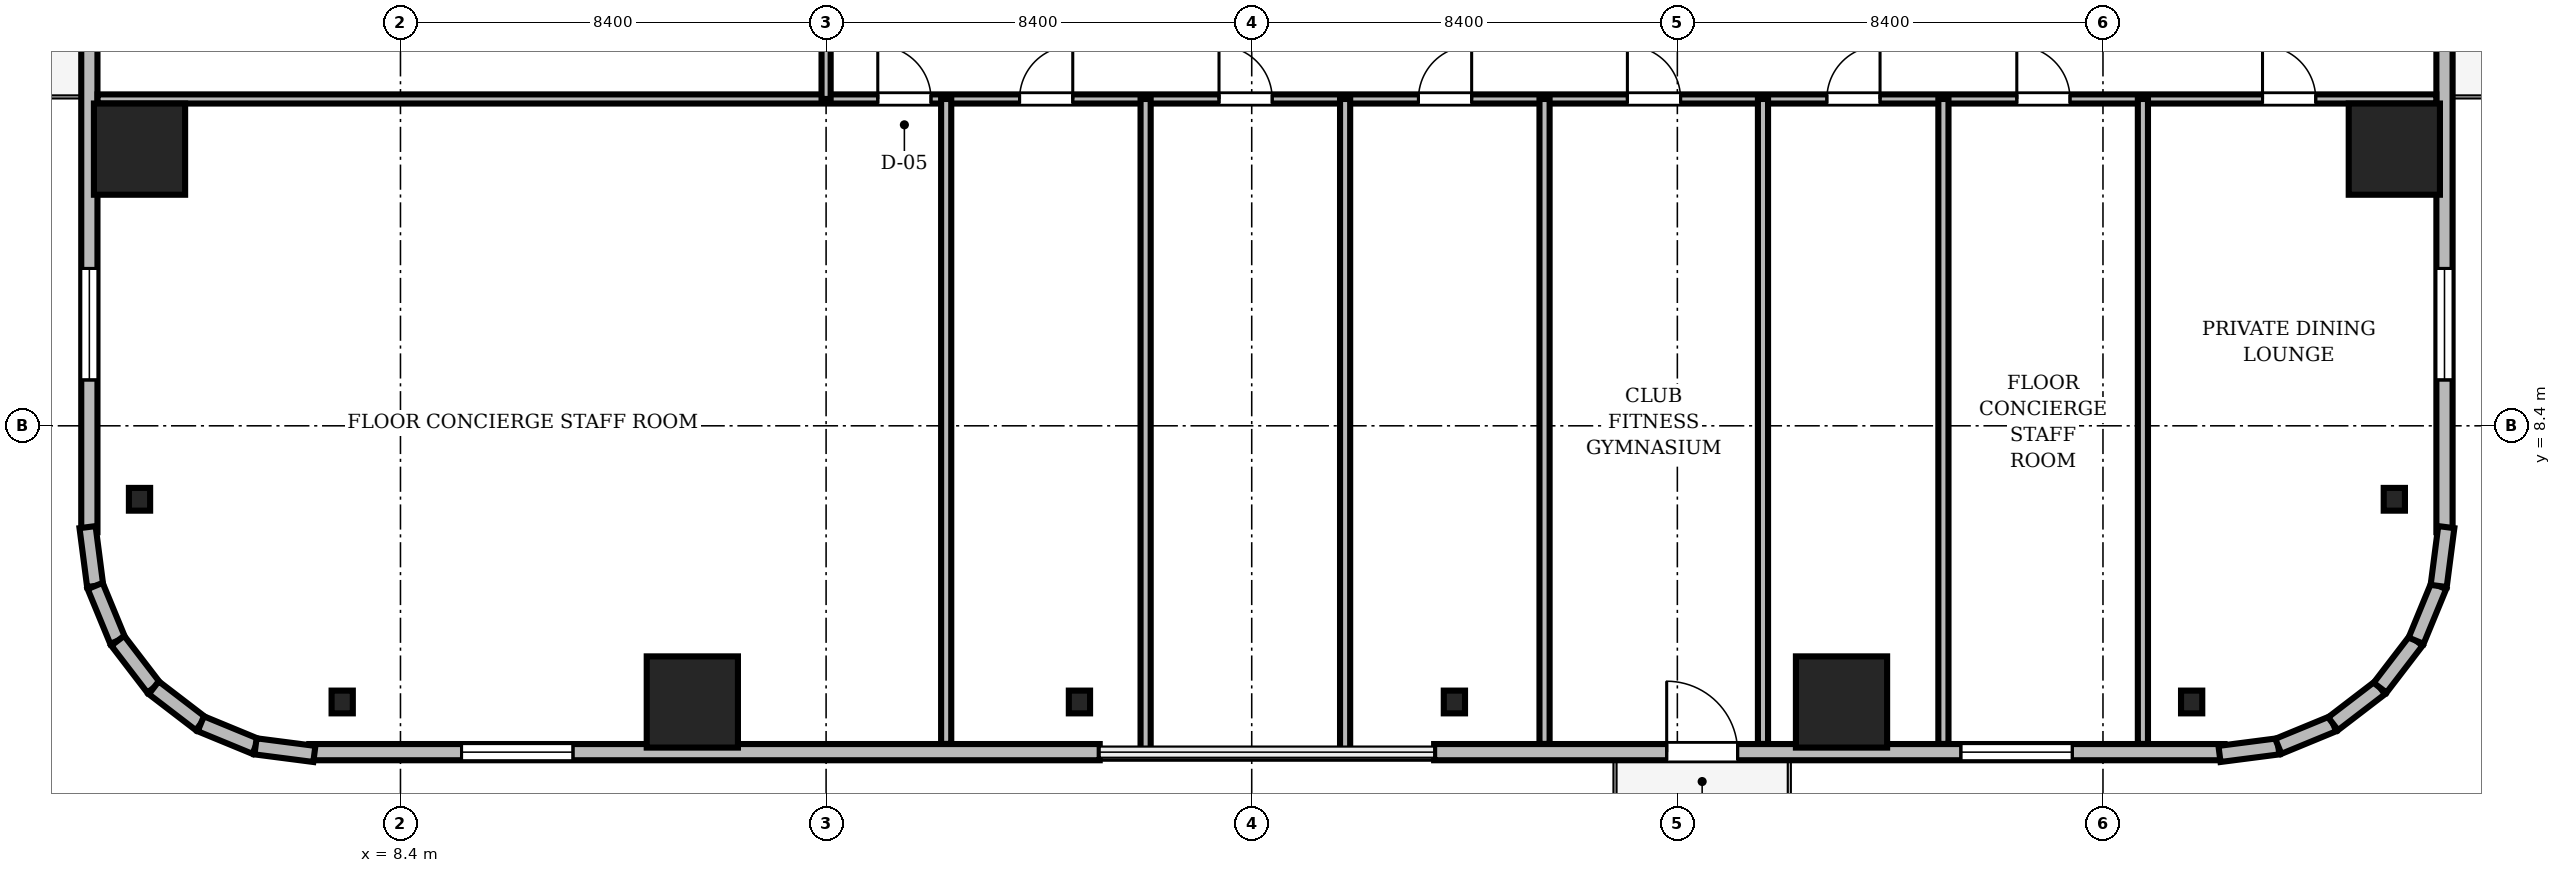
"""IFC4 building model, lengths in metres.
Left out: names, types, materials, properties, quantities, classifications, styles, units other than length and angle.
Written with IfcOpenShell. Run it as: python <this file> out.ifc"""

import sys

from ifc_helpers import new_model, si_unit, direction, frame, frame_2d, origin, origin_2d, place, context, subcontext, project, spatial, rectangle, i_section, extrude, source, transform, mapped, element, fill, save


model = new_model("IFC4")
c1 = context("Model", 3, precision=1e-05, world=origin(), true_north=direction((0.0, 1.0)))
c2 = subcontext(c1, "Body", "Model", "MODEL_VIEW")
j1 = project(units=[si_unit("LENGTHUNIT", "METRE"), si_unit("PLANEANGLEUNIT", "RADIAN")], contexts=[c1])
p1 = place(None, origin())
s1 = spatial("IfcSite", under=j1, at=p1, CompositionType="ELEMENT")
p2 = place(p1, origin())
s2 = spatial("IfcBuilding", under=s1, at=p2, CompositionType="ELEMENT")
p3 = place(p2, frame((0.0, 0.0, 53.15)))
s3 = spatial("IfcBuildingStorey", under=s2, at=p3, CompositionType="ELEMENT", Elevation=53.15)
m1 = source(origin(), c2, "Body", "SweptSolid", [
    extrude(rectangle(XDim=1.8, YDim=1.8, at=origin_2d()), origin(), (0.0, 0.0, 1.0), 3.41),
])
for number, where, z_axis, x_axis in (
    (1, (14.16, 2.95, 0.0), (0.0, 0.0, 1.0), (1.0, 0.0, 0.0)),
    (2, (36.84, 2.95, 0.0), (0.0, 0.0, 1.0), (1.0, 0.0, 0.0)),
    (3, (47.75, 13.86, 0.0), (0.0, 0.0, 1.0), (1.0, 0.0, 0.0)),
    (4, (3.25, 13.86, 0.0), (0.0, 0.0, 1.0), (1.0, 0.0, 0.0)),
):
    element("IfcColumn", number, at=place(p3, frame(where, z_axis=z_axis, x_axis=x_axis)), inside=s3, PredefinedType="COLUMN", context=c2, shape_type="MappedRepresentation", body=[
        mapped(m1, transform((0.0, 0.0, 0.0), scale=1.0)),
    ])
m2 = source(origin(), c2, "Body", "SweptSolid", [
    extrude(i_section(OverallWidth=0.419, OverallDepth=0.449, WebThickness=0.031, FlangeThickness=0.048, FilletRadius=0.015, at=origin_2d()), origin(), (0.0, 0.0, 1.0), 3.41),
])
for number, where, z_axis, x_axis in (
    (5, (7.25, 2.95, 0.0), (0.0, 0.0, 1.0), (1.0, 0.0, 0.0)),
    (6, (21.8, 2.95, 0.0), (0.0, 0.0, 1.0), (1.0, 0.0, 0.0)),
    (7, (29.2, 2.95, 0.0), (0.0, 0.0, 1.0), (1.0, 0.0, 0.0)),
    (8, (43.75, 2.95, 0.0), (0.0, 0.0, 1.0), (1.0, 0.0, 0.0)),
    (9, (47.75, 6.95, 0.0), (0.0, 0.0, 1.0), (1.0, 0.0, 0.0)),
    (10, (3.25, 6.95, 0.0), (0.0, 0.0, 1.0), (1.0, 0.0, 0.0)),
):
    element("IfcColumn", number, at=place(p3, frame(where, z_axis=z_axis, x_axis=x_axis)), inside=s3, PredefinedType="COLUMN", context=c2, shape_type="MappedRepresentation", body=[
        mapped(m2, transform((0.0, 0.0, 0.0), scale=1.0)),
    ])
m3 = source(origin(), c2, "Body", "SweptSolid", [
    extrude(rectangle(XDim=15.6, YDim=0.32, at=frame_2d((7.8, 0.0))), origin(), (0.0, 0.0, 1.0), 3.41),
])
p4 = place(p3, frame((6.6, 1.96, 0.0), z_axis=(0.0, 0.0, 1.0), x_axis=(1.0, 0.0, 0.0)))
e11 = element("IfcWall", 11, at=p4, inside=s3, PredefinedType="SOLIDWALL", context=c2, shape_type="MappedRepresentation", body=[
    mapped(m3, transform((0.0, 0.0, 0.0), scale=1.0)),
])
m4 = source(origin(), c2, "Body", "SweptSolid", [
    extrude(rectangle(XDim=2.2, YDim=2.4, at=frame_2d((1.1, 1.2))), frame((0.0, 0.17, 0.0), z_axis=(0.0, -1.0, 0.0), x_axis=(1.0, 0.0, 0.0)), (0.0, 0.0, 1.0), 0.34),
])
p5 = place(p4, frame((3.005, 0.0, 0.72)))
e12 = element("IfcOpeningElement", 12, at=p5, cuts=e11, PredefinedType="OPENING", context=c2, shape_type="MappedRepresentation", body=[
    mapped(m4, transform((0.0, 0.0, 0.0), scale=1.0)),
])
p6 = place(p3, frame((28.8, 1.96, 0.0), z_axis=(0.0, 0.0, 1.0), x_axis=(1.0, 0.0, 0.0)))
e13 = element("IfcWall", 13, at=p6, inside=s3, PredefinedType="SOLIDWALL", context=c2, shape_type="MappedRepresentation", body=[
    mapped(m3, transform((0.0, 0.0, 0.0), scale=1.0)),
])
m5 = source(origin(), c2, "Body", "SweptSolid", [
    extrude(rectangle(XDim=1.4, YDim=2.3, at=frame_2d((0.7, 1.15))), frame((0.0, 0.17, 0.0), z_axis=(0.0, -1.0, 0.0), x_axis=(1.0, 0.0, 0.0)), (0.0, 0.0, 1.0), 0.34),
])
p7 = place(p6, frame((4.59, 0.0, 0.0)))
e14 = element("IfcOpeningElement", 14, at=p7, cuts=e13, PredefinedType="OPENING", context=c2, shape_type="MappedRepresentation", body=[
    mapped(m5, transform((0.0, 0.0, 0.0), scale=1.0)),
])
p8 = place(p6, frame((10.395, 0.0, 0.72)))
e15 = element("IfcOpeningElement", 15, at=p8, cuts=e13, PredefinedType="OPENING", context=c2, shape_type="MappedRepresentation", body=[
    mapped(m4, transform((0.0, 0.0, 0.0), scale=1.0)),
])
p9 = place(p3, frame((2.26, 21.9, 0.0), z_axis=(0.0, 0.0, 1.0), x_axis=(0.0, -1.0, 0.0)))
e16 = element("IfcWall", 16, at=p9, inside=s3, PredefinedType="SOLIDWALL", context=c2, shape_type="MappedRepresentation", body=[
    mapped(m3, transform((0.0, 0.0, 0.0), scale=1.0)),
])
p10 = place(p9, frame((4.59, 0.0, 0.0)))
e17 = element("IfcOpeningElement", 17, at=p10, cuts=e16, PredefinedType="OPENING", context=c2, shape_type="MappedRepresentation", body=[
    mapped(m5, transform((0.0, 0.0, 0.0), scale=1.0)),
])
p11 = place(p9, frame((10.395, 0.0, 0.72)))
e18 = element("IfcOpeningElement", 18, at=p11, cuts=e16, PredefinedType="OPENING", context=c2, shape_type="MappedRepresentation", body=[
    mapped(m4, transform((0.0, 0.0, 0.0), scale=1.0)),
])
p12 = place(p3, frame((48.74, 6.3, 0.0), z_axis=(0.0, 0.0, 1.0), x_axis=(0.0, 1.0, 0.0)))
e19 = element("IfcWall", 19, at=p12, inside=s3, PredefinedType="SOLIDWALL", context=c2, shape_type="MappedRepresentation", body=[
    mapped(m3, transform((0.0, 0.0, 0.0), scale=1.0)),
])
p13 = place(p12, frame((9.61, 0.0, 0.0)))
e20 = element("IfcOpeningElement", 20, at=p13, cuts=e19, PredefinedType="OPENING", context=c2, shape_type="MappedRepresentation", body=[
    mapped(m5, transform((0.0, 0.0, 0.0), scale=1.0)),
])
p14 = place(p12, frame((3.005, 0.0, 0.72)))
e21 = element("IfcOpeningElement", 21, at=p14, cuts=e19, PredefinedType="OPENING", context=c2, shape_type="MappedRepresentation", body=[
    mapped(m4, transform((0.0, 0.0, 0.0), scale=1.0)),
])
m6 = source(origin(), c2, "Body", "SweptSolid", [
    extrude(rectangle(XDim=1.171, YDim=0.32, at=frame_2d((0.585, 0.0))), origin(), (0.0, 0.0, 1.0), 3.41),
])
p15 = place(p3, frame((2.224, 6.401, 0.0), z_axis=(0.0, 0.0, 1.0), x_axis=(0.128269133229, -0.991739395941, 0.0)))
e22 = element("IfcWall", 22, at=p15, inside=s3, PredefinedType="SOLIDWALL", context=c2, shape_type="MappedRepresentation", body=[
    mapped(m6, transform((0.0, 0.0, 0.0), scale=1.0)),
])
m7 = source(origin(), c2, "Body", "SweptSolid", [
    extrude(rectangle(XDim=1.169, YDim=0.32, at=frame_2d((0.584, 0.0))), origin(), (0.0, 0.0, 1.0), 3.41),
])
for number, where, z_axis, x_axis in (
    (23, (2.375, 5.24, 0.0), (0.0, 0.0, 1.0), (0.381, -0.925, 0.0)),
    (24, (2.82, 4.159, 0.0), (0.0, 0.0, 1.0), (0.608, -0.794, 0.0)),
):
    element("IfcWall", number, at=place(p3, frame(where, z_axis=z_axis, x_axis=x_axis)), inside=s3, PredefinedType="SOLIDWALL", context=c2, shape_type="MappedRepresentation", body=[
        mapped(m7, transform((0.0, 0.0, 0.0), scale=1.0)),
    ])
m8 = source(origin(), c2, "Body", "SweptSolid", [
    extrude(rectangle(XDim=1.169, YDim=0.32, at=frame_2d((0.584, 0.0))), origin(), (0.0, 0.0, 1.0), 3.41),
])
p16 = place(p3, frame((3.531, 3.231, 0.0), z_axis=(0.0, 0.0, 1.0), x_axis=(0.793663520347, -0.608356981114, 0.0)))
e25 = element("IfcWall", 25, at=p16, inside=s3, PredefinedType="SOLIDWALL", context=c2, shape_type="MappedRepresentation", body=[
    mapped(m8, transform((0.0, 0.0, 0.0), scale=1.0)),
])
m9 = source(origin(), c2, "Body", "SweptSolid", [
    extrude(rectangle(XDim=1.169, YDim=0.32, at=frame_2d((0.585, 0.0))), origin(), (0.0, 0.0, 1.0), 3.41),
])
p17 = place(p3, frame((4.459, 2.52, 0.0), z_axis=(0.0, 0.0, 1.0), x_axis=(0.924479075121, -0.381232789334, 0.0)))
e26 = element("IfcWall", 26, at=p17, inside=s3, PredefinedType="SOLIDWALL", context=c2, shape_type="MappedRepresentation", body=[
    mapped(m9, transform((0.0, 0.0, 0.0), scale=1.0)),
])
m10 = source(origin(), c2, "Body", "SweptSolid", [
    extrude(rectangle(XDim=1.17, YDim=0.32, at=frame_2d((0.585, 0.0))), origin(), (0.0, 0.0, 1.0), 3.41),
])
for number, where, z_axis, x_axis in (
    (27, (5.54, 2.074, 0.0), (0.0, 0.0, 1.0), (0.992, -0.128, 0.0)),
    (28, (44.3, 1.925, 0.0), (0.0, 0.0, 1.0), (0.992, 0.128, 0.0)),
):
    element("IfcWall", number, at=place(p3, frame(where, z_axis=z_axis, x_axis=x_axis)), inside=s3, PredefinedType="SOLIDWALL", context=c2, shape_type="MappedRepresentation", body=[
        mapped(m10, transform((0.0, 0.0, 0.0), scale=1.0)),
    ])
p18 = place(p3, frame((45.46, 2.074, 0.0), z_axis=(0.0, 0.0, 1.0), x_axis=(0.924479075121, 0.381232789334, 0.0)))
e29 = element("IfcWall", 29, at=p18, inside=s3, PredefinedType="SOLIDWALL", context=c2, shape_type="MappedRepresentation", body=[
    mapped(m9, transform((0.0, 0.0, 0.0), scale=1.0)),
])
p19 = place(p3, frame((46.541, 2.52, 0.0), z_axis=(0.0, 0.0, 1.0), x_axis=(0.793663520347, 0.608356981114, 0.0)))
e30 = element("IfcWall", 30, at=p19, inside=s3, PredefinedType="SOLIDWALL", context=c2, shape_type="MappedRepresentation", body=[
    mapped(m8, transform((0.0, 0.0, 0.0), scale=1.0)),
])
for number, where, z_axis, x_axis in (
    (31, (47.469, 3.231, 0.0), (0.0, 0.0, 1.0), (0.608, 0.794, 0.0)),
    (32, (48.18, 4.159, 0.0), (0.0, 0.0, 1.0), (0.381, 0.925, 0.0)),
):
    element("IfcWall", number, at=place(p3, frame(where, z_axis=z_axis, x_axis=x_axis)), inside=s3, PredefinedType="SOLIDWALL", context=c2, shape_type="MappedRepresentation", body=[
        mapped(m7, transform((0.0, 0.0, 0.0), scale=1.0)),
    ])
p20 = place(p3, frame((48.625, 5.24, 0.0), z_axis=(0.0, 0.0, 1.0), x_axis=(0.128269133229, 0.991739395941, 0.0)))
e33 = element("IfcWall", 33, at=p20, inside=s3, PredefinedType="SOLIDWALL", context=c2, shape_type="MappedRepresentation", body=[
    mapped(m6, transform((0.0, 0.0, 0.0), scale=1.0)),
])
m11 = source(origin(), c2, "Body", "SweptSolid", [
    extrude(rectangle(XDim=46.156, YDim=0.18, at=frame_2d((23.078, 0.0))), origin(), (0.0, 0.0, 1.0), 2.652),
])
p21 = place(p3, frame((2.422, 14.85, 0.0), z_axis=(0.0, 0.0, 1.0), x_axis=(1.0, 0.0, 0.0)))
e34 = element("IfcWall", 34, at=p21, inside=s3, PredefinedType="PARTITIONING", context=c2, shape_type="MappedRepresentation", body=[
    mapped(m11, transform((0.0, 0.0, 0.0), scale=1.0)),
])
m12 = source(origin(), c2, "Body", "SweptSolid", [
    extrude(rectangle(XDim=1.05, YDim=2.2, at=frame_2d((0.525, 1.1))), frame((0.0, 0.1, 0.0), z_axis=(0.0, -1.0, 0.0), x_axis=(1.0, 0.0, 0.0)), (0.0, 0.0, 1.0), 0.2),
])
p22 = place(p21, frame((15.398, 0.0, 0.0)))
e35 = element("IfcOpeningElement", 35, at=p22, cuts=e34, PredefinedType="OPENING", context=c2, shape_type="MappedRepresentation", body=[
    mapped(m12, transform((0.0, 0.0, 0.0), scale=1.0)),
])
p23 = place(p21, frame((18.196, 0.0, 0.0)))
e36 = element("IfcOpeningElement", 36, at=p23, cuts=e34, PredefinedType="OPENING", context=c2, shape_type="MappedRepresentation", body=[
    mapped(m12, transform((0.0, 0.0, 0.0), scale=1.0)),
])
p24 = place(p21, frame((22.132, 0.0, 0.0)))
e37 = element("IfcOpeningElement", 37, at=p24, cuts=e34, PredefinedType="OPENING", context=c2, shape_type="MappedRepresentation", body=[
    mapped(m12, transform((0.0, 0.0, 0.0), scale=1.0)),
])
p25 = place(p21, frame((26.069, 0.0, 0.0)))
e38 = element("IfcOpeningElement", 38, at=p25, cuts=e34, PredefinedType="OPENING", context=c2, shape_type="MappedRepresentation", body=[
    mapped(m12, transform((0.0, 0.0, 0.0), scale=1.0)),
])
p26 = place(p21, frame((30.192, 0.0, 0.0)))
e39 = element("IfcOpeningElement", 39, at=p26, cuts=e34, PredefinedType="OPENING", context=c2, shape_type="MappedRepresentation", body=[
    mapped(m12, transform((0.0, 0.0, 0.0), scale=1.0)),
])
p27 = place(p21, frame((34.128, 0.0, 0.0)))
e40 = element("IfcOpeningElement", 40, at=p27, cuts=e34, PredefinedType="OPENING", context=c2, shape_type="MappedRepresentation", body=[
    mapped(m12, transform((0.0, 0.0, 0.0), scale=1.0)),
])
p28 = place(p21, frame((37.877, 0.0, 0.0)))
e41 = element("IfcOpeningElement", 41, at=p28, cuts=e34, PredefinedType="OPENING", context=c2, shape_type="MappedRepresentation", body=[
    mapped(m12, transform((0.0, 0.0, 0.0), scale=1.0)),
])
p29 = place(p21, frame((42.727, 0.0, 0.0)))
e42 = element("IfcOpeningElement", 42, at=p29, cuts=e34, PredefinedType="OPENING", context=c2, shape_type="MappedRepresentation", body=[
    mapped(m12, transform((0.0, 0.0, 0.0), scale=1.0)),
])
m13 = source(origin(), c2, "Body", "SweptSolid", [
    extrude(rectangle(XDim=13.7, YDim=0.18, at=frame_2d((6.85, 0.0))), origin(), (0.0, 0.0, 1.0), 2.802),
])
p30 = place(p3, frame((16.8, 14.85, 0.0), z_axis=(0.0, 0.0, 1.0), x_axis=(0.0, 1.0, 0.0)))
e43 = element("IfcWall", 43, at=p30, inside=s3, PredefinedType="PARTITIONING", context=c2, shape_type="MappedRepresentation", body=[
    mapped(m13, transform((0.0, 0.0, 0.0), scale=1.0)),
])
p31 = place(p30, frame((2.867, 0.0, 0.0)))
e44 = element("IfcOpeningElement", 44, at=p31, cuts=e43, PredefinedType="OPENING", context=c2, shape_type="MappedRepresentation", body=[
    mapped(m12, transform((0.0, 0.0, 0.0), scale=1.0)),
])
m14 = source(origin(), c2, "Body", "SweptSolid", [
    extrude(rectangle(XDim=0.95, YDim=2.15, at=frame_2d((0.475, 1.075))), frame((0.0, 0.1, 0.0), z_axis=(0.0, -1.0, 0.0), x_axis=(1.0, 0.0, 0.0)), (0.0, 0.0, 1.0), 0.2),
])
p32 = place(p30, frame((10.867, 0.0, 0.0)))
e45 = element("IfcOpeningElement", 45, at=p32, cuts=e43, PredefinedType="OPENING", context=c2, shape_type="MappedRepresentation", body=[
    mapped(m14, transform((0.0, 0.0, 0.0), scale=1.0)),
])
m15 = source(origin(), c2, "Body", "SweptSolid", [
    extrude(rectangle(XDim=12.728, YDim=0.2, at=frame_2d((6.364, 0.0))), origin(), (0.0, 0.0, 1.0), 2.652),
])
p33 = place(p3, frame((19.17, 2.122, 0.0), z_axis=(0.0, 0.0, 1.0), x_axis=(0.0, 1.0, 0.0)))
e46 = element("IfcWall", 46, at=p33, inside=s3, PredefinedType="PARTITIONING", context=c2, shape_type="MappedRepresentation", body=[
    mapped(m15, transform((0.0, 0.0, 0.0), scale=1.0)),
])
m16 = source(origin(), c2, "Body", "SweptSolid", [
    extrude(rectangle(XDim=12.92, YDim=0.2, at=frame_2d((6.46, 0.0))), origin(), (0.0, 0.0, 1.0), 2.652),
])
for number, where, z_axis, x_axis in (
    (47, (23.106, 1.93, 0.0), (0.0, 0.0, 1.0), (0.0, 1.0, 0.0)),
    (48, (27.043, 1.93, 0.0), (0.0, 0.0, 1.0), (0.0, 1.0, 0.0)),
):
    element("IfcWall", number, at=place(p3, frame(where, z_axis=z_axis, x_axis=x_axis)), inside=s3, PredefinedType="PARTITIONING", context=c2, shape_type="MappedRepresentation", body=[
        mapped(m16, transform((0.0, 0.0, 0.0), scale=1.0)),
    ])
for number, where, z_axis, x_axis in (
    (49, (30.979, 2.122, 0.0), (0.0, 0.0, 1.0), (0.0, 1.0, 0.0)),
    (50, (35.29, 2.122, 0.0), (0.0, 0.0, 1.0), (0.0, 1.0, 0.0)),
    (51, (38.851, 2.122, 0.0), (0.0, 0.0, 1.0), (0.0, 1.0, 0.0)),
    (52, (42.788, 2.122, 0.0), (0.0, 0.0, 1.0), (0.0, 1.0, 0.0)),
):
    element("IfcWall", number, at=place(p3, frame(where, z_axis=z_axis, x_axis=x_axis)), inside=s3, PredefinedType="PARTITIONING", context=c2, shape_type="MappedRepresentation", body=[
        mapped(m15, transform((0.0, 0.0, 0.0), scale=1.0)),
    ])
m17 = source(origin(), c2, "Body", "SweptSolid", [
    extrude(rectangle(XDim=1.4, YDim=2.3, at=frame_2d((0.7, 1.15))), frame((0.0, 0.025, 0.0), z_axis=(0.0, -1.0, 0.0), x_axis=(1.0, 0.0, 0.0)), (0.0, 0.0, 1.0), 0.05),
])
p34 = place(p7, frame((1.4, 0.0, 0.0), z_axis=(0.0, 0.0, 1.0), x_axis=(-1.0, 0.0, 0.0)))
e53 = element("IfcDoor", 53, at=p34, inside=s3, OperationType="DOUBLE_DOOR_SLIDING", PredefinedType="DOOR", context=c2, shape_type="MappedRepresentation", body=[
    mapped(m17, transform((0.0, 0.0, 0.0), scale=1.0)),
])
fill(e14, e53)
m18 = source(origin(), c2, "Body", "SweptSolid", [
    extrude(rectangle(XDim=2.2, YDim=2.4, at=frame_2d((1.1, 1.2))), frame((0.0, 0.03, 0.0), z_axis=(0.0, -1.0, 0.0), x_axis=(1.0, 0.0, 0.0)), (0.0, 0.0, 1.0), 0.06),
])
p35 = place(p5, origin())
e54 = element("IfcWindow", 54, at=p35, inside=s3, PartitioningType="SINGLE_PANEL", PredefinedType="WINDOW", context=c2, shape_type="MappedRepresentation", body=[
    mapped(m18, transform((0.0, 0.0, 0.0), scale=1.0)),
])
fill(e12, e54)
p36 = place(p8, origin())
e55 = element("IfcWindow", 55, at=p36, inside=s3, PartitioningType="SINGLE_PANEL", PredefinedType="WINDOW", context=c2, shape_type="MappedRepresentation", body=[
    mapped(m18, transform((0.0, 0.0, 0.0), scale=1.0)),
])
fill(e15, e55)
p37 = place(p11, origin())
e56 = element("IfcWindow", 56, at=p37, inside=s3, PartitioningType="SINGLE_PANEL", PredefinedType="WINDOW", context=c2, shape_type="MappedRepresentation", body=[
    mapped(m18, transform((0.0, 0.0, 0.0), scale=1.0)),
])
fill(e18, e56)
p38 = place(p14, origin())
e57 = element("IfcWindow", 57, at=p38, inside=s3, PartitioningType="SINGLE_PANEL", PredefinedType="WINDOW", context=c2, shape_type="MappedRepresentation", body=[
    mapped(m18, transform((0.0, 0.0, 0.0), scale=1.0)),
])
fill(e21, e57)
m19 = source(origin(), c2, "Body", "SweptSolid", [
    extrude(rectangle(XDim=1.05, YDim=2.2, at=frame_2d((0.525, 1.1))), frame((0.0, 0.025, 0.0), z_axis=(0.0, -1.0, 0.0), x_axis=(1.0, 0.0, 0.0)), (0.0, 0.0, 1.0), 0.05),
])
p39 = place(p22, origin())
e58 = element("IfcDoor", 58, at=p39, inside=s3, OperationType="SINGLE_SWING_LEFT", PredefinedType="DOOR", context=c2, shape_type="MappedRepresentation", body=[
    mapped(m19, transform((0.0, 0.0, 0.0), scale=1.0)),
])
fill(e35, e58)
p40 = place(p23, origin())
e59 = element("IfcDoor", 59, at=p40, inside=s3, OperationType="SINGLE_SWING_RIGHT", PredefinedType="DOOR", context=c2, shape_type="MappedRepresentation", body=[
    mapped(m19, transform((0.0, 0.0, 0.0), scale=1.0)),
])
fill(e36, e59)
p41 = place(p24, origin())
e60 = element("IfcDoor", 60, at=p41, inside=s3, OperationType="SINGLE_SWING_LEFT", PredefinedType="DOOR", context=c2, shape_type="MappedRepresentation", body=[
    mapped(m19, transform((0.0, 0.0, 0.0), scale=1.0)),
])
fill(e37, e60)
p42 = place(p25, origin())
e61 = element("IfcDoor", 61, at=p42, inside=s3, OperationType="SINGLE_SWING_RIGHT", PredefinedType="DOOR", context=c2, shape_type="MappedRepresentation", body=[
    mapped(m19, transform((0.0, 0.0, 0.0), scale=1.0)),
])
fill(e38, e61)
p43 = place(p26, origin())
e62 = element("IfcDoor", 62, at=p43, inside=s3, OperationType="SINGLE_SWING_LEFT", PredefinedType="DOOR", context=c2, shape_type="MappedRepresentation", body=[
    mapped(m19, transform((0.0, 0.0, 0.0), scale=1.0)),
])
fill(e39, e62)
p44 = place(p27, origin())
e63 = element("IfcDoor", 63, at=p44, inside=s3, OperationType="SINGLE_SWING_RIGHT", PredefinedType="DOOR", context=c2, shape_type="MappedRepresentation", body=[
    mapped(m19, transform((0.0, 0.0, 0.0), scale=1.0)),
])
fill(e40, e63)
p45 = place(p28, origin())
e64 = element("IfcDoor", 64, at=p45, inside=s3, OperationType="SINGLE_SWING_LEFT", PredefinedType="DOOR", context=c2, shape_type="MappedRepresentation", body=[
    mapped(m19, transform((0.0, 0.0, 0.0), scale=1.0)),
])
fill(e41, e64)
p46 = place(p29, origin())
e65 = element("IfcDoor", 65, at=p46, inside=s3, OperationType="SINGLE_SWING_LEFT", PredefinedType="DOOR", context=c2, shape_type="MappedRepresentation", body=[
    mapped(m19, transform((0.0, 0.0, 0.0), scale=1.0)),
])
fill(e42, e65)
save(model, sys.argv[1])
